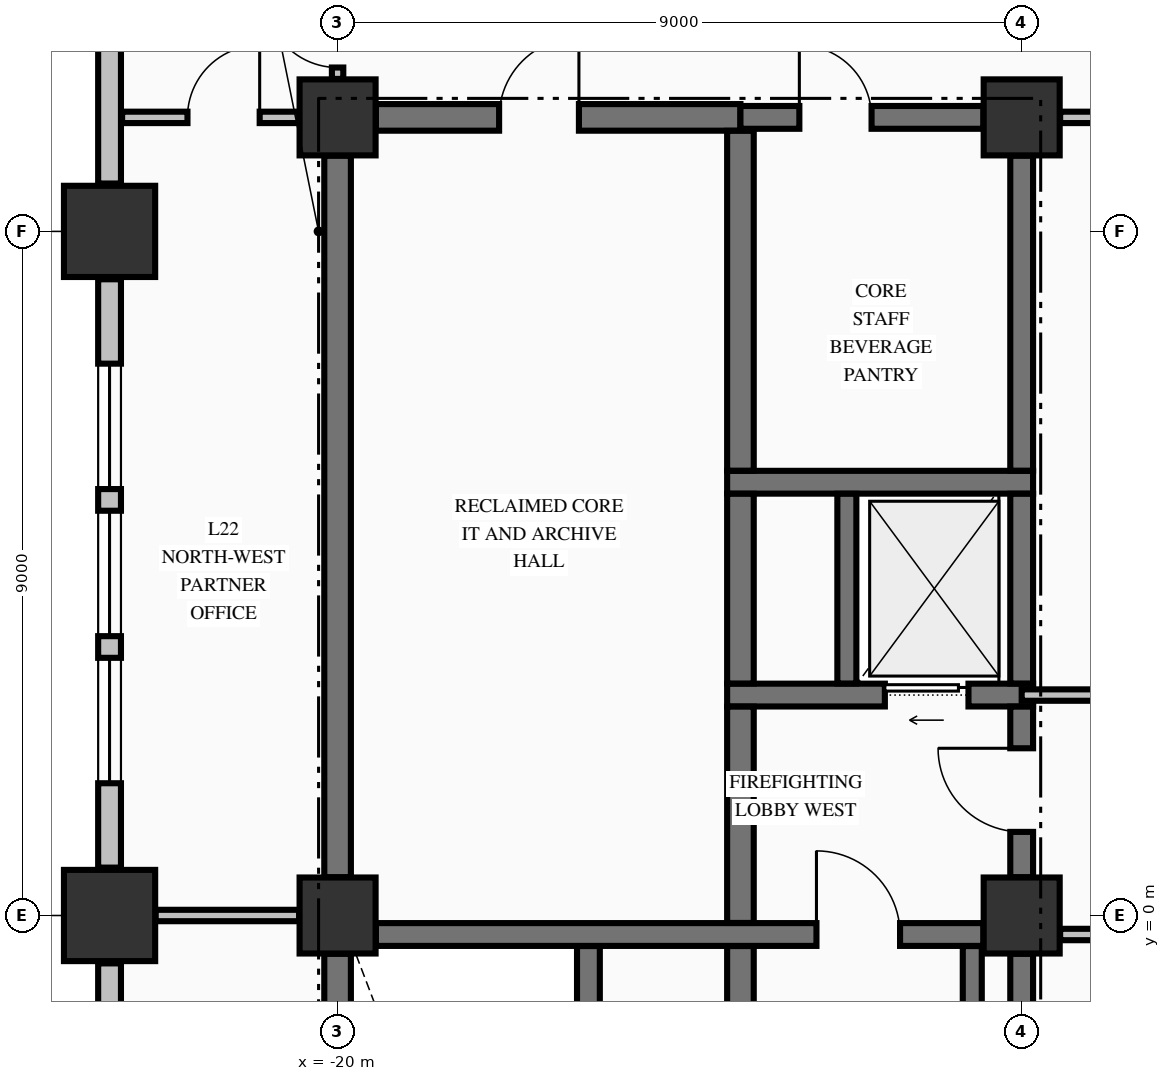
"""IFC4 building model, lengths in metres.
Left out: names, types, materials, properties, quantities, classifications, styles, units other than length and angle.
Written with IfcOpenShell. Run it as: python <this file> out.ifc"""

import sys

from ifc_helpers import new_model, si_unit, direction, frame, frame_2d, origin, origin_2d, place, context, subcontext, project, spatial, rectangle, extrude, element, fill, save


model = new_model("IFC4")
c1 = context("Model", 3, precision=1e-05, world=origin(), true_north=direction((0.0, 1.0)))
c2 = subcontext(c1, "Body", "Model", "MODEL_VIEW")
j1 = project(units=[si_unit("LENGTHUNIT", "METRE"), si_unit("PLANEANGLEUNIT", "RADIAN")], contexts=[c1])
p1 = place(None, origin())
s1 = spatial("IfcSite", under=j1, at=p1, CompositionType="ELEMENT")
p2 = place(p1, origin())
s2 = spatial("IfcBuilding", under=s1, at=p2, CompositionType="ELEMENT")
p3 = place(p2, frame((0.0, 0.0, 91.36)))
s3 = spatial("IfcBuildingStorey", under=s2, at=p3, CompositionType="ELEMENT", Elevation=91.36)
for number, where, z_axis, x_axis in (
    (1, (-23.0, 0.0, -0.25), (0.0, 0.0, 1.0), (1.0, 0.0, 0.0)),
    (2, (-23.0, 9.0, -0.25), (0.0, 0.0, 1.0), (1.0, 0.0, 0.0)),
):
    element("IfcColumn", number, at=place(p3, frame(where, z_axis=z_axis, x_axis=x_axis)), inside=s3, PredefinedType="COLUMN", context=c2, shape_type="SweptSolid", body=[
        extrude(rectangle(XDim=1.2, YDim=1.2, at=origin_2d()), origin(), (0.0, 0.0, 1.0), 3.57),
    ])
for number, where, z_axis, x_axis in (
    (3, (-20.0, 10.5, -0.25), (0.0, 0.0, 1.0), (1.0, 0.0, 0.0)),
    (4, (-11.0, 0.0, -0.25), (0.0, 0.0, 1.0), (1.0, 0.0, 0.0)),
    (5, (-11.0, 10.5, -0.25), (0.0, 0.0, 1.0), (1.0, 0.0, 0.0)),
    (6, (-20.0, 0.0, -0.25), (0.0, 0.0, 1.0), (1.0, 0.0, 0.0)),
):
    element("IfcColumn", number, at=place(p3, frame(where, z_axis=z_axis, x_axis=x_axis)), inside=s3, PredefinedType="COLUMN", context=c2, shape_type="SweptSolid", body=[
        extrude(rectangle(XDim=1.0, YDim=1.0, at=origin_2d()), origin(), (0.0, 0.0, 1.0), 3.57),
    ])
p4 = place(p3, frame((-23.0, -0.63, 0.0), z_axis=(0.0, 0.0, 1.0), x_axis=(0.0, -1.0, 0.0)))
e7 = element("IfcWall", 7, at=p4, inside=s3, PredefinedType="STANDARD", context=c2, shape_type="SweptSolid", body=[
    extrude(rectangle(XDim=7.74, YDim=0.3, at=frame_2d((3.87, 0.0))), origin(), (0.0, 0.0, 1.0), 2.712),
])
p5 = place(p4, frame((1.11, 0.0, 0.8)))
e8 = element("IfcOpeningElement", 8, at=p5, cuts=e7, PredefinedType="OPENING", context=c2, shape_type="SweptSolid", body=[
    extrude(rectangle(XDim=1.65, YDim=1.7, at=frame_2d((0.825, 0.85))), frame((0.0, 0.16, 0.0), z_axis=(0.0, -1.0, 0.0), x_axis=(1.0, 0.0, 0.0)), (0.0, 0.0, 1.0), 0.32),
])
p6 = place(p4, frame((3.045, 0.0, 0.8)))
e9 = element("IfcOpeningElement", 9, at=p6, cuts=e7, PredefinedType="OPENING", context=c2, shape_type="SweptSolid", body=[
    extrude(rectangle(XDim=1.65, YDim=1.7, at=frame_2d((0.825, 0.85))), frame((0.0, 0.16, 0.0), z_axis=(0.0, -1.0, 0.0), x_axis=(1.0, 0.0, 0.0)), (0.0, 0.0, 1.0), 0.32),
])
p7 = place(p4, frame((4.98, 0.0, 0.8)))
e10 = element("IfcOpeningElement", 10, at=p7, cuts=e7, PredefinedType="OPENING", context=c2, shape_type="SweptSolid", body=[
    extrude(rectangle(XDim=1.65, YDim=1.7, at=frame_2d((0.825, 0.85))), frame((0.0, 0.16, 0.0), z_axis=(0.0, -1.0, 0.0), x_axis=(1.0, 0.0, 0.0)), (0.0, 0.0, 1.0), 0.32),
])
p8 = place(p3, frame((-23.0, 8.37, 0.0), z_axis=(0.0, 0.0, 1.0), x_axis=(0.0, -1.0, 0.0)))
e11 = element("IfcWall", 11, at=p8, inside=s3, PredefinedType="STANDARD", context=c2, shape_type="SweptSolid", body=[
    extrude(rectangle(XDim=7.74, YDim=0.3, at=frame_2d((3.87, 0.0))), origin(), (0.0, 0.0, 1.0), 2.712),
])
p9 = place(p8, frame((1.11, 0.0, 0.8)))
e12 = element("IfcOpeningElement", 12, at=p9, cuts=e11, PredefinedType="OPENING", context=c2, shape_type="SweptSolid", body=[
    extrude(rectangle(XDim=1.65, YDim=1.7, at=frame_2d((0.825, 0.85))), frame((0.0, 0.16, 0.0), z_axis=(0.0, -1.0, 0.0), x_axis=(1.0, 0.0, 0.0)), (0.0, 0.0, 1.0), 0.32),
])
p10 = place(p8, frame((3.045, 0.0, 0.8)))
e13 = element("IfcOpeningElement", 13, at=p10, cuts=e11, PredefinedType="OPENING", context=c2, shape_type="SweptSolid", body=[
    extrude(rectangle(XDim=1.65, YDim=1.7, at=frame_2d((0.825, 0.85))), frame((0.0, 0.16, 0.0), z_axis=(0.0, -1.0, 0.0), x_axis=(1.0, 0.0, 0.0)), (0.0, 0.0, 1.0), 0.32),
])
p11 = place(p8, frame((4.98, 0.0, 0.8)))
e14 = element("IfcOpeningElement", 14, at=p11, cuts=e11, PredefinedType="OPENING", context=c2, shape_type="SweptSolid", body=[
    extrude(rectangle(XDim=1.65, YDim=1.7, at=frame_2d((0.825, 0.85))), frame((0.0, 0.16, 0.0), z_axis=(0.0, -1.0, 0.0), x_axis=(1.0, 0.0, 0.0)), (0.0, 0.0, 1.0), 0.32),
])
p12 = place(p3, frame((-23.0, 20.37, 0.0), z_axis=(0.0, 0.0, 1.0), x_axis=(0.0, -1.0, 0.0)))
e15 = element("IfcWall", 15, at=p12, inside=s3, PredefinedType="STANDARD", context=c2, shape_type="SweptSolid", body=[
    extrude(rectangle(XDim=10.74, YDim=0.3, at=frame_2d((5.37, 0.0))), origin(), (0.0, 0.0, 1.0), 2.712),
])
p13 = place(p3, frame((-19.496, -0.25, 0.0), z_axis=(0.0, 0.0, 1.0), x_axis=(1.0, 0.0, 0.0)))
e16 = element("IfcWall", 16, at=p13, inside=s3, PredefinedType="SHEAR", context=c2, shape_type="SweptSolid", body=[
    extrude(rectangle(XDim=7.992, YDim=0.3, at=frame_2d((3.996, 0.0))), origin(), (0.0, 0.0, 1.0), 3.32),
])
p14 = place(p13, frame((5.796, 0.0, 0.0)))
e17 = element("IfcOpeningElement", 17, at=p14, cuts=e16, PredefinedType="OPENING", context=c2, shape_type="SweptSolid", body=[
    extrude(rectangle(XDim=1.1, YDim=2.15, at=frame_2d((0.55, 1.075))), frame((0.0, 0.16, 0.0), z_axis=(0.0, -1.0, 0.0), x_axis=(1.0, 0.0, 0.0)), (0.0, 0.0, 1.0), 0.32),
])
p15 = place(p3, frame((-14.875, 2.9, 0.0), z_axis=(0.0, 0.0, 1.0), x_axis=(1.0, 0.0, 0.0)))
e18 = element("IfcWall", 18, at=p15, inside=s3, PredefinedType="SHEAR", context=c2, shape_type="SweptSolid", body=[
    extrude(rectangle(XDim=4.025, YDim=0.3, at=frame_2d((2.012, 0.0))), origin(), (0.0, 0.0, 1.0), 3.32),
])
p16 = place(p15, frame((2.075, 0.0, 0.0)))
e19 = element("IfcOpeningElement", 19, at=p16, cuts=e18, PredefinedType="OPENING", context=c2, shape_type="SweptSolid", body=[
    extrude(rectangle(XDim=1.1, YDim=2.2, at=frame_2d((0.55, 1.1))), frame((0.0, 0.16, 0.0), z_axis=(0.0, -1.0, 0.0), x_axis=(1.0, 0.0, 0.0)), (0.0, 0.0, 1.0), 0.32),
])
p17 = place(p3, frame((-14.875, 5.7, 0.0), z_axis=(0.0, 0.0, 1.0), x_axis=(1.0, 0.0, 0.0)))
e20 = element("IfcWall", 20, at=p17, inside=s3, PredefinedType="SHEAR", context=c2, shape_type="SweptSolid", body=[
    extrude(rectangle(XDim=4.025, YDim=0.3, at=frame_2d((2.012, 0.0))), origin(), (0.0, 0.0, 1.0), 3.32),
])
p18 = place(p3, frame((-19.496, 10.5, 0.0), z_axis=(0.0, 0.0, 1.0), x_axis=(1.0, 0.0, 0.0)))
e21 = element("IfcWall", 21, at=p18, inside=s3, PredefinedType="SHEAR", context=c2, shape_type="SweptSolid", body=[
    extrude(rectangle(XDim=4.796, YDim=0.35, at=frame_2d((2.398, 0.0))), origin(), (0.0, 0.0, 1.0), 3.32),
])
p19 = place(p18, frame((1.621, 0.0, 0.0)))
e22 = element("IfcOpeningElement", 22, at=p19, cuts=e21, PredefinedType="OPENING", context=c2, shape_type="SweptSolid", body=[
    extrude(rectangle(XDim=1.05, YDim=2.15, at=frame_2d((0.525, 1.075))), frame((0.0, 0.185, 0.0), z_axis=(0.0, -1.0, 0.0), x_axis=(1.0, 0.0, 0.0)), (0.0, 0.0, 1.0), 0.37),
])
p20 = place(p3, frame((-14.7, 10.5, 0.0), z_axis=(0.0, 0.0, 1.0), x_axis=(1.0, 0.0, 0.0)))
e23 = element("IfcWall", 23, at=p20, inside=s3, PredefinedType="SHEAR", context=c2, shape_type="SweptSolid", body=[
    extrude(rectangle(XDim=3.196, YDim=0.3, at=frame_2d((1.598, 0.0))), origin(), (0.0, 0.0, 1.0), 3.32),
])
p21 = place(p20, frame((0.775, 0.0, 0.0)))
e24 = element("IfcOpeningElement", 24, at=p21, cuts=e23, PredefinedType="OPENING", context=c2, shape_type="SweptSolid", body=[
    extrude(rectangle(XDim=0.95, YDim=2.15, at=frame_2d((0.475, 1.075))), frame((0.0, 0.16, 0.0), z_axis=(0.0, -1.0, 0.0), x_axis=(1.0, 0.0, 0.0)), (0.0, 0.0, 1.0), 0.32),
])
p22 = place(p3, frame((-10.494, -0.25, 0.0), z_axis=(0.0, 0.0, 1.0), x_axis=(1.0, 0.0, 0.0)))
e25 = element("IfcWall", 25, at=p22, inside=s3, PredefinedType="PARTITIONING", context=c2, shape_type="SweptSolid", body=[
    extrude(rectangle(XDim=20.988, YDim=0.15, at=frame_2d((10.494, 0.0))), origin(), (0.0, 0.0, 1.0), 3.32),
])
p23 = place(p22, frame((8.194, 0.0, 0.0)))
e26 = element("IfcOpeningElement", 26, at=p23, cuts=e25, PredefinedType="OPENING", context=c2, shape_type="SweptSolid", body=[
    extrude(rectangle(XDim=1.1, YDim=2.15, at=frame_2d((0.55, 1.075))), frame((0.0, 0.085, 0.0), z_axis=(0.0, -1.0, 0.0), x_axis=(1.0, 0.0, 0.0)), (0.0, 0.0, 1.0), 0.17),
])
p24 = place(p22, frame((3.049, 0.0, 0.0)))
e27 = element("IfcOpeningElement", 27, at=p24, cuts=e25, PredefinedType="OPENING", context=c2, shape_type="SweptSolid", body=[
    extrude(rectangle(XDim=1.05, YDim=2.15, at=frame_2d((0.525, 1.075))), frame((0.0, 0.085, 0.0), z_axis=(0.0, -1.0, 0.0), x_axis=(1.0, 0.0, 0.0)), (0.0, 0.0, 1.0), 0.17),
])
p25 = place(p22, frame((15.189, 0.0, 0.0)))
e28 = element("IfcOpeningElement", 28, at=p25, cuts=e25, PredefinedType="OPENING", context=c2, shape_type="SweptSolid", body=[
    extrude(rectangle(XDim=0.95, YDim=2.15, at=frame_2d((0.475, 1.075))), frame((0.0, 0.085, 0.0), z_axis=(0.0, -1.0, 0.0), x_axis=(1.0, 0.0, 0.0)), (0.0, 0.0, 1.0), 0.17),
])
p26 = place(p3, frame((-22.394, 0.0, 0.0), z_axis=(0.0, 0.0, 1.0), x_axis=(1.0, 0.0, 0.0)))
e29 = element("IfcWall", 29, at=p26, inside=s3, PredefinedType="PARTITIONING", context=c2, shape_type="SweptSolid", body=[
    extrude(rectangle(XDim=1.888, YDim=0.15, at=frame_2d((0.944, 0.0))), origin(), (0.0, 0.0, 1.0), 2.81),
])
p27 = place(p3, frame((-11.0, 2.9, 0.0), z_axis=(0.0, 0.0, 1.0), x_axis=(1.0, 0.0, 0.0)))
e30 = element("IfcWall", 30, at=p27, inside=s3, PredefinedType="PARTITIONING", context=c2, shape_type="SweptSolid", body=[
    extrude(rectangle(XDim=22.0, YDim=0.15, at=frame_2d((11.0, 0.0))), origin(), (0.0, 0.0, 1.0), 3.32),
])
p28 = place(p27, frame((8.7, 0.0, 0.0)))
e31 = element("IfcOpeningElement", 31, at=p28, cuts=e30, PredefinedType="OPENING", context=c2, shape_type="SweptSolid", body=[
    extrude(rectangle(XDim=1.1, YDim=2.15, at=frame_2d((0.55, 1.075))), frame((0.0, 0.085, 0.0), z_axis=(0.0, -1.0, 0.0), x_axis=(1.0, 0.0, 0.0)), (0.0, 0.0, 1.0), 0.17),
])
p29 = place(p27, frame((3.555, 0.0, 0.0)))
e32 = element("IfcOpeningElement", 32, at=p29, cuts=e30, PredefinedType="OPENING", context=c2, shape_type="SweptSolid", body=[
    extrude(rectangle(XDim=1.05, YDim=2.15, at=frame_2d((0.525, 1.075))), frame((0.0, 0.085, 0.0), z_axis=(0.0, -1.0, 0.0), x_axis=(1.0, 0.0, 0.0)), (0.0, 0.0, 1.0), 0.17),
])
p30 = place(p27, frame((15.62, 0.0, 0.0)))
e33 = element("IfcOpeningElement", 33, at=p30, cuts=e30, PredefinedType="OPENING", context=c2, shape_type="SweptSolid", body=[
    extrude(rectangle(XDim=1.1, YDim=2.15, at=frame_2d((0.55, 1.075))), frame((0.0, 0.085, 0.0), z_axis=(0.0, -1.0, 0.0), x_axis=(1.0, 0.0, 0.0)), (0.0, 0.0, 1.0), 0.17),
])
p31 = place(p3, frame((-22.835, 10.5, 0.0), z_axis=(0.0, 0.0, 1.0), x_axis=(1.0, 0.0, 0.0)))
e34 = element("IfcWall", 34, at=p31, inside=s3, PredefinedType="PARTITIONING", context=c2, shape_type="SweptSolid", body=[
    extrude(rectangle(XDim=2.329, YDim=0.15, at=frame_2d((1.165, 0.0))), origin(), (0.0, 0.0, 1.0), 3.32),
])
p32 = place(p31, frame((0.86, 0.0, 0.0)))
e35 = element("IfcOpeningElement", 35, at=p32, cuts=e34, PredefinedType="OPENING", context=c2, shape_type="SweptSolid", body=[
    extrude(rectangle(XDim=0.95, YDim=2.15, at=frame_2d((0.475, 1.075))), frame((0.0, 0.085, 0.0), z_axis=(0.0, -1.0, 0.0), x_axis=(1.0, 0.0, 0.0)), (0.0, 0.0, 1.0), 0.17),
])
p33 = place(p3, frame((-10.494, 10.5, 0.0), z_axis=(0.0, 0.0, 1.0), x_axis=(1.0, 0.0, 0.0)))
e36 = element("IfcWall", 36, at=p33, inside=s3, PredefinedType="PARTITIONING", context=c2, shape_type="SweptSolid", body=[
    extrude(rectangle(XDim=20.988, YDim=0.15, at=frame_2d((10.494, 0.0))), origin(), (0.0, 0.0, 1.0), 3.32),
])
p34 = place(p33, frame((8.194, 0.0, 0.0)))
e37 = element("IfcOpeningElement", 37, at=p34, cuts=e36, PredefinedType="OPENING", context=c2, shape_type="SweptSolid", body=[
    extrude(rectangle(XDim=1.1, YDim=2.15, at=frame_2d((0.55, 1.075))), frame((0.0, 0.085, 0.0), z_axis=(0.0, -1.0, 0.0), x_axis=(1.0, 0.0, 0.0)), (0.0, 0.0, 1.0), 0.17),
])
p35 = place(p3, frame((-20.0, -9.446, 0.0), z_axis=(0.0, 0.0, 1.0), x_axis=(0.0, 1.0, 0.0)))
e38 = element("IfcWall", 38, at=p35, inside=s3, PredefinedType="SHEAR", context=c2, shape_type="SweptSolid", body=[
    extrude(rectangle(XDim=8.942, YDim=0.35, at=frame_2d((4.471, 0.0))), origin(), (0.0, 0.0, 1.0), 3.32),
])
p36 = place(p3, frame((-20.0, 0.504, 0.0), z_axis=(0.0, 0.0, 1.0), x_axis=(0.0, 1.0, 0.0)))
e39 = element("IfcWall", 39, at=p36, inside=s3, PredefinedType="SHEAR", context=c2, shape_type="SweptSolid", body=[
    extrude(rectangle(XDim=9.492, YDim=0.35, at=frame_2d((4.746, 0.0))), origin(), (0.0, 0.0, 1.0), 3.32),
])
p37 = place(p3, frame((-16.7, -9.773, 0.0), z_axis=(0.0, 0.0, 1.0), x_axis=(0.0, 1.0, 0.0)))
e40 = element("IfcWall", 40, at=p37, inside=s3, PredefinedType="SHEAR", context=c2, shape_type="SweptSolid", body=[
    extrude(rectangle(XDim=9.371, YDim=0.3, at=frame_2d((4.686, 0.0))), origin(), (0.0, 0.0, 1.0), 3.32),
])
p38 = place(p3, frame((-14.7, -9.773, 0.0), z_axis=(0.0, 0.0, 1.0), x_axis=(0.0, 1.0, 0.0)))
e41 = element("IfcWall", 41, at=p38, inside=s3, PredefinedType="SHEAR", context=c2, shape_type="SweptSolid", body=[
    extrude(rectangle(XDim=9.371, YDim=0.35, at=frame_2d((4.686, 0.0))), origin(), (0.0, 0.0, 1.0), 3.32),
])
p39 = place(p3, frame((-14.7, -0.098, 0.0), z_axis=(0.0, 0.0, 1.0), x_axis=(0.0, 1.0, 0.0)))
e42 = element("IfcWall", 42, at=p39, inside=s3, PredefinedType="SHEAR", context=c2, shape_type="SweptSolid", body=[
    extrude(rectangle(XDim=2.846, YDim=0.35, at=frame_2d((1.423, 0.0))), origin(), (0.0, 0.0, 1.0), 3.32),
])
p40 = place(p3, frame((-14.7, 3.052, 0.0), z_axis=(0.0, 0.0, 1.0), x_axis=(0.0, 1.0, 0.0)))
e43 = element("IfcWall", 43, at=p40, inside=s3, PredefinedType="SHEAR", context=c2, shape_type="SweptSolid", body=[
    extrude(rectangle(XDim=2.496, YDim=0.35, at=frame_2d((1.248, 0.0))), origin(), (0.0, 0.0, 1.0), 3.32),
])
p41 = place(p3, frame((-14.7, 5.852, 0.0), z_axis=(0.0, 0.0, 1.0), x_axis=(0.0, 1.0, 0.0)))
e44 = element("IfcWall", 44, at=p41, inside=s3, PredefinedType="SHEAR", context=c2, shape_type="SweptSolid", body=[
    extrude(rectangle(XDim=4.471, YDim=0.35, at=frame_2d((2.235, 0.0))), origin(), (0.0, 0.0, 1.0), 3.32),
])
p42 = place(p3, frame((-13.3, 3.052, 0.0), z_axis=(0.0, 0.0, 1.0), x_axis=(0.0, 1.0, 0.0)))
e45 = element("IfcWall", 45, at=p42, inside=s3, PredefinedType="SOLIDWALL", context=c2, shape_type="SweptSolid", body=[
    extrude(rectangle(XDim=2.496, YDim=0.25, at=frame_2d((1.248, 0.0))), origin(), (0.0, 0.0, 1.0), 3.32),
])
p43 = place(p3, frame((-11.65, -9.798, 0.0), z_axis=(0.0, 0.0, 1.0), x_axis=(0.0, 1.0, 0.0)))
e46 = element("IfcWall", 46, at=p43, inside=s3, PredefinedType="SOLIDWALL", context=c2, shape_type="SweptSolid", body=[
    extrude(rectangle(XDim=9.396, YDim=0.25, at=frame_2d((4.698, 0.0))), origin(), (0.0, 0.0, 1.0), 3.32),
])
p44 = place(p3, frame((-11.0, -9.446, 0.0), z_axis=(0.0, 0.0, 1.0), x_axis=(0.0, 1.0, 0.0)))
e47 = element("IfcWall", 47, at=p44, inside=s3, PredefinedType="SHEAR", context=c2, shape_type="SweptSolid", body=[
    extrude(rectangle(XDim=8.942, YDim=0.3, at=frame_2d((4.471, 0.0))), origin(), (0.0, 0.0, 1.0), 3.32),
])
p45 = place(p3, frame((-11.0, 0.504, 0.0), z_axis=(0.0, 0.0, 1.0), x_axis=(0.0, 1.0, 0.0)))
e48 = element("IfcWall", 48, at=p45, inside=s3, PredefinedType="SHEAR", context=c2, shape_type="SweptSolid", body=[
    extrude(rectangle(XDim=2.244, YDim=0.3, at=frame_2d((1.122, 0.0))), origin(), (0.0, 0.0, 1.0), 3.32),
])
p46 = place(p45, frame((0.596, 0.0, 0.0)))
e49 = element("IfcOpeningElement", 49, at=p46, cuts=e48, PredefinedType="OPENING", context=c2, shape_type="SweptSolid", body=[
    extrude(rectangle(XDim=1.1, YDim=2.15, at=frame_2d((0.55, 1.075))), frame((0.0, 0.16, 0.0), z_axis=(0.0, -1.0, 0.0), x_axis=(1.0, 0.0, 0.0)), (0.0, 0.0, 1.0), 0.32),
])
p47 = place(p3, frame((-11.0, 3.052, 0.0), z_axis=(0.0, 0.0, 1.0), x_axis=(0.0, 1.0, 0.0)))
e50 = element("IfcWall", 50, at=p47, inside=s3, PredefinedType="SHEAR", context=c2, shape_type="SweptSolid", body=[
    extrude(rectangle(XDim=2.496, YDim=0.3, at=frame_2d((1.248, 0.0))), origin(), (0.0, 0.0, 1.0), 3.32),
])
p48 = place(p3, frame((-11.0, 5.852, 0.0), z_axis=(0.0, 0.0, 1.0), x_axis=(0.0, 1.0, 0.0)))
e51 = element("IfcWall", 51, at=p48, inside=s3, PredefinedType="SHEAR", context=c2, shape_type="SweptSolid", body=[
    extrude(rectangle(XDim=4.144, YDim=0.3, at=frame_2d((2.072, 0.0))), origin(), (0.0, 0.0, 1.0), 3.32),
])
p49 = place(p3, frame((-20.0, 11.006, 0.0), z_axis=(0.0, 0.0, 1.0), x_axis=(0.0, 1.0, 0.0)))
e52 = element("IfcWall", 52, at=p49, inside=s3, PredefinedType="PARTITIONING", context=c2, shape_type="SweptSolid", body=[
    extrude(rectangle(XDim=1.666, YDim=0.15, at=frame_2d((0.833, 0.0))), origin(), (0.0, 0.0, 1.0), 2.81),
])
p50 = place(p49, frame((0.15, 0.0, 0.0)))
e53 = element("IfcOpeningElement", 53, at=p50, cuts=e52, PredefinedType="OPENING", context=c2, shape_type="SweptSolid", body=[
    extrude(rectangle(XDim=0.95, YDim=2.15, at=frame_2d((0.475, 1.075))), frame((0.0, 0.085, 0.0), z_axis=(0.0, -1.0, 0.0), x_axis=(1.0, 0.0, 0.0)), (0.0, 0.0, 1.0), 0.17),
])
p51 = place(p9, origin())
e54 = element("IfcWindow", 54, at=p51, inside=s3, PartitioningType="SINGLE_PANEL", PredefinedType="WINDOW", context=c2, shape_type="SweptSolid", body=[
    extrude(rectangle(XDim=1.65, YDim=1.7, at=frame_2d((0.825, 0.85))), frame((0.0, 0.03, 0.0), z_axis=(0.0, -1.0, 0.0), x_axis=(1.0, 0.0, 0.0)), (0.0, 0.0, 1.0), 0.06),
])
fill(e12, e54)
p52 = place(p10, origin())
e55 = element("IfcWindow", 55, at=p52, inside=s3, PartitioningType="SINGLE_PANEL", PredefinedType="WINDOW", context=c2, shape_type="SweptSolid", body=[
    extrude(rectangle(XDim=1.65, YDim=1.7, at=frame_2d((0.825, 0.85))), frame((0.0, 0.03, 0.0), z_axis=(0.0, -1.0, 0.0), x_axis=(1.0, 0.0, 0.0)), (0.0, 0.0, 1.0), 0.06),
])
fill(e13, e55)
p53 = place(p11, origin())
e56 = element("IfcWindow", 56, at=p53, inside=s3, PartitioningType="SINGLE_PANEL", PredefinedType="WINDOW", context=c2, shape_type="SweptSolid", body=[
    extrude(rectangle(XDim=1.65, YDim=1.7, at=frame_2d((0.825, 0.85))), frame((0.0, 0.03, 0.0), z_axis=(0.0, -1.0, 0.0), x_axis=(1.0, 0.0, 0.0)), (0.0, 0.0, 1.0), 0.06),
])
fill(e14, e56)
p54 = place(p14, origin())
e57 = element("IfcDoor", 57, at=p54, inside=s3, OperationType="SINGLE_SWING_LEFT", PredefinedType="DOOR", context=c2, shape_type="SweptSolid", body=[
    extrude(rectangle(XDim=1.1, YDim=2.15, at=frame_2d((0.55, 1.075))), frame((0.0, 0.025, 0.0), z_axis=(0.0, -1.0, 0.0), x_axis=(1.0, 0.0, 0.0)), (0.0, 0.0, 1.0), 0.05),
])
fill(e17, e57)
p55 = place(p46, origin())
e58 = element("IfcDoor", 58, at=p55, inside=s3, OperationType="SINGLE_SWING_RIGHT", PredefinedType="DOOR", context=c2, shape_type="SweptSolid", body=[
    extrude(rectangle(XDim=1.1, YDim=2.15, at=frame_2d((0.55, 1.075))), frame((0.0, 0.025, 0.0), z_axis=(0.0, -1.0, 0.0), x_axis=(1.0, 0.0, 0.0)), (0.0, 0.0, 1.0), 0.05),
])
fill(e49, e58)
p56 = place(p16, origin())
e59 = element("IfcDoor", 59, at=p56, inside=s3, OperationType="SLIDING_TO_LEFT", PredefinedType="DOOR", context=c2, shape_type="SweptSolid", body=[
    extrude(rectangle(XDim=1.1, YDim=2.2, at=frame_2d((0.55, 1.1))), frame((0.0, 0.025, 0.0), z_axis=(0.0, -1.0, 0.0), x_axis=(1.0, 0.0, 0.0)), (0.0, 0.0, 1.0), 0.05),
])
fill(e19, e59)
p57 = place(p21, origin())
e60 = element("IfcDoor", 60, at=p57, inside=s3, OperationType="SINGLE_SWING_LEFT", PredefinedType="DOOR", context=c2, shape_type="SweptSolid", body=[
    extrude(rectangle(XDim=0.95, YDim=2.15, at=frame_2d((0.475, 1.075))), frame((0.0, 0.025, 0.0), z_axis=(0.0, -1.0, 0.0), x_axis=(1.0, 0.0, 0.0)), (0.0, 0.0, 1.0), 0.05),
])
fill(e24, e60)
p58 = place(p19, origin())
e61 = element("IfcDoor", 61, at=p58, inside=s3, OperationType="SINGLE_SWING_RIGHT", PredefinedType="DOOR", context=c2, shape_type="SweptSolid", body=[
    extrude(rectangle(XDim=1.05, YDim=2.15, at=frame_2d((0.525, 1.075))), frame((0.0, 0.025, 0.0), z_axis=(0.0, -1.0, 0.0), x_axis=(1.0, 0.0, 0.0)), (0.0, 0.0, 1.0), 0.05),
])
fill(e22, e61)
p59 = place(p50, origin())
e62 = element("IfcDoor", 62, at=p59, inside=s3, OperationType="SINGLE_SWING_RIGHT", PredefinedType="DOOR", context=c2, shape_type="SweptSolid", body=[
    extrude(rectangle(XDim=0.95, YDim=2.15, at=frame_2d((0.475, 1.075))), frame((0.0, 0.025, 0.0), z_axis=(0.0, -1.0, 0.0), x_axis=(1.0, 0.0, 0.0)), (0.0, 0.0, 1.0), 0.05),
])
fill(e53, e62)
p60 = place(p32, origin())
e63 = element("IfcDoor", 63, at=p60, inside=s3, OperationType="SINGLE_SWING_RIGHT", PredefinedType="DOOR", context=c2, shape_type="SweptSolid", body=[
    extrude(rectangle(XDim=0.95, YDim=2.15, at=frame_2d((0.475, 1.075))), frame((0.0, 0.025, 0.0), z_axis=(0.0, -1.0, 0.0), x_axis=(1.0, 0.0, 0.0)), (0.0, 0.0, 1.0), 0.05),
])
fill(e35, e63)
save(model, sys.argv[1])
